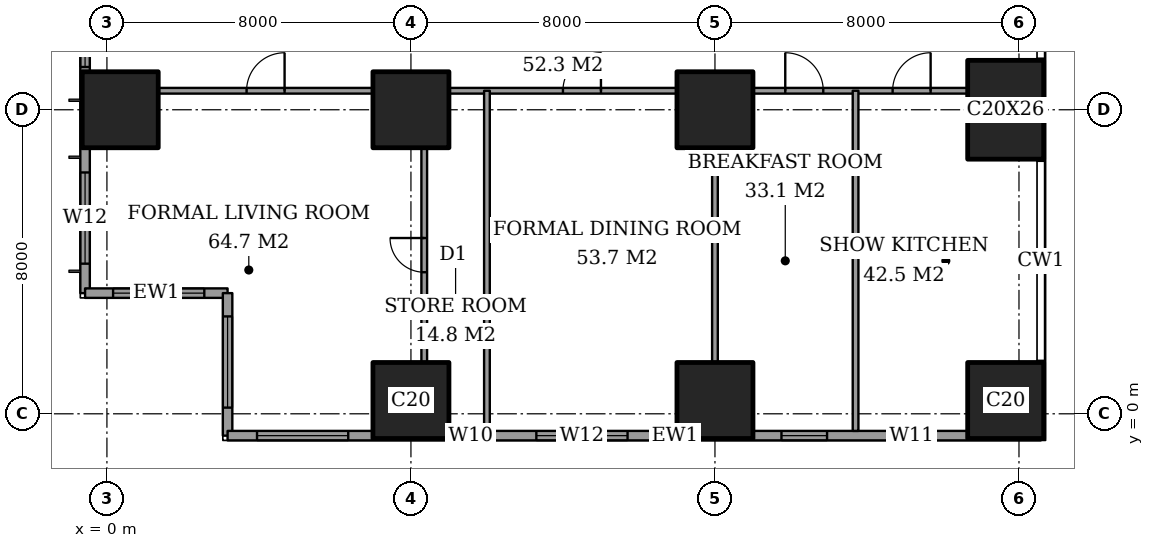
"""IFC4 building model, lengths in metres.
Left out: names, types, materials, properties, quantities, classifications, styles, units other than length and angle.
Written with IfcOpenShell. Run it as: python <this file> out.ifc"""

import sys

from ifc_helpers import new_model, si_unit, direction, frame, frame_2d, origin, origin_2d, place, context, subcontext, project, spatial, rectangle, extrude, element, fill, save


model = new_model("IFC4")
c1 = context("Model", 3, precision=1e-05, world=origin(), true_north=direction((0.0, 1.0)))
c2 = subcontext(c1, "Body", "Model", "MODEL_VIEW")
j1 = project(units=[si_unit("LENGTHUNIT", "METRE"), si_unit("PLANEANGLEUNIT", "RADIAN")], contexts=[c1])
p1 = place(None, origin())
s1 = spatial("IfcSite", under=j1, at=p1, CompositionType="ELEMENT")
p2 = place(p1, origin())
s2 = spatial("IfcBuilding", under=s1, at=p2, CompositionType="ELEMENT")
p3 = place(p2, frame((0.0, 0.0, 128.6)))
s3 = spatial("IfcBuildingStorey", under=s2, at=p3, CompositionType="ELEMENT", Elevation=128.6)
for number, where, z_axis, x_axis in (
    (1, (0.35, 8.0, 0.0), (0.0, 0.0, 1.0), (1.0, 0.0, 0.0)),
    (2, (8.0, 0.35, 0.0), (0.0, 0.0, 1.0), (1.0, 0.0, 0.0)),
    (3, (8.0, 8.0, 0.0), (0.0, 0.0, 1.0), (1.0, 0.0, 0.0)),
    (4, (16.0, 0.35, 0.0), (0.0, 0.0, 1.0), (1.0, 0.0, 0.0)),
    (5, (16.0, 8.0, 0.0), (0.0, 0.0, 1.0), (1.0, 0.0, 0.0)),
    (6, (23.65, 0.35, 0.0), (0.0, 0.0, 1.0), (1.0, 0.0, 0.0)),
):
    element("IfcColumn", number, at=place(p3, frame(where, z_axis=z_axis, x_axis=x_axis)), inside=s3, PredefinedType="COLUMN", context=c2, shape_type="SweptSolid", body=[
        extrude(rectangle(XDim=2.0, YDim=2.0, at=origin_2d()), origin(), (0.0, 0.0, 1.0), 3.6),
    ])
p4 = place(p3, frame((23.65, 8.0, 0.0), z_axis=(0.0, 0.0, 1.0), x_axis=(1.0, 0.0, 0.0)))
e7 = element("IfcColumn", 7, at=p4, inside=s3, PredefinedType="COLUMN", context=c2, shape_type="SweptSolid", body=[
    extrude(rectangle(XDim=2.0, YDim=2.6, at=origin_2d()), origin(), (0.0, 0.0, 1.0), 3.6),
])
p5 = place(p3, frame((-0.575, 44.825, 0.0), z_axis=(0.0, 0.0, 1.0), x_axis=(0.0, -1.0, 0.0)))
e8 = element("IfcWall", 8, at=p5, inside=s3, PredefinedType="SOLIDWALL", context=c2, shape_type="SweptSolid", body=[
    extrude(rectangle(XDim=41.65, YDim=0.25, at=frame_2d((20.825, 0.0))), origin(), (0.0, 0.0, 1.0), 3.6),
])
p6 = place(p5, frame((0.775, 0.0, 0.4)))
e9 = element("IfcOpeningElement", 9, at=p6, cuts=e8, PredefinedType="OPENING", context=c2, shape_type="SweptSolid", body=[
    extrude(rectangle(XDim=2.4, YDim=2.2, at=frame_2d((1.2, 1.1))), frame((0.0, 0.135, 0.0), z_axis=(0.0, -1.0, 0.0), x_axis=(1.0, 0.0, 0.0)), (0.0, 0.0, 1.0), 0.27),
])
p7 = place(p5, frame((6.2, 0.0, 0.4)))
e10 = element("IfcOpeningElement", 10, at=p7, cuts=e8, PredefinedType="OPENING", context=c2, shape_type="SweptSolid", body=[
    extrude(rectangle(XDim=1.2, YDim=2.2, at=frame_2d((0.6, 1.1))), frame((0.0, 0.135, 0.0), z_axis=(0.0, -1.0, 0.0), x_axis=(1.0, 0.0, 0.0)), (0.0, 0.0, 1.0), 0.27),
])
p8 = place(p5, frame((8.525, 0.0, 0.4)))
e11 = element("IfcOpeningElement", 11, at=p8, cuts=e8, PredefinedType="OPENING", context=c2, shape_type="SweptSolid", body=[
    extrude(rectangle(XDim=2.4, YDim=2.2, at=frame_2d((1.2, 1.1))), frame((0.0, 0.135, 0.0), z_axis=(0.0, -1.0, 0.0), x_axis=(1.0, 0.0, 0.0)), (0.0, 0.0, 1.0), 0.27),
])
p9 = place(p5, frame((15.625, 0.0, 0.4)))
e12 = element("IfcOpeningElement", 12, at=p9, cuts=e8, PredefinedType="OPENING", context=c2, shape_type="SweptSolid", body=[
    extrude(rectangle(XDim=2.4, YDim=2.2, at=frame_2d((1.2, 1.1))), frame((0.0, 0.135, 0.0), z_axis=(0.0, -1.0, 0.0), x_axis=(1.0, 0.0, 0.0)), (0.0, 0.0, 1.0), 0.27),
])
p10 = place(p5, frame((23.625, 0.0, 0.4)))
e13 = element("IfcOpeningElement", 13, at=p10, cuts=e8, PredefinedType="OPENING", context=c2, shape_type="SweptSolid", body=[
    extrude(rectangle(XDim=2.4, YDim=2.2, at=frame_2d((1.2, 1.1))), frame((0.0, 0.135, 0.0), z_axis=(0.0, -1.0, 0.0), x_axis=(1.0, 0.0, 0.0)), (0.0, 0.0, 1.0), 0.27),
])
p11 = place(p5, frame((30.825, 0.0, 0.4)))
e14 = element("IfcOpeningElement", 14, at=p11, cuts=e8, PredefinedType="OPENING", context=c2, shape_type="SweptSolid", body=[
    extrude(rectangle(XDim=2.4, YDim=2.2, at=frame_2d((1.2, 1.1))), frame((0.0, 0.135, 0.0), z_axis=(0.0, -1.0, 0.0), x_axis=(1.0, 0.0, 0.0)), (0.0, 0.0, 1.0), 0.27),
])
p12 = place(p5, frame((34.5, 0.0, 0.4)))
e15 = element("IfcOpeningElement", 15, at=p12, cuts=e8, PredefinedType="OPENING", context=c2, shape_type="SweptSolid", body=[
    extrude(rectangle(XDim=1.2, YDim=2.2, at=frame_2d((0.6, 1.1))), frame((0.0, 0.135, 0.0), z_axis=(0.0, -1.0, 0.0), x_axis=(1.0, 0.0, 0.0)), (0.0, 0.0, 1.0), 0.27),
])
p13 = place(p5, frame((38.475, 0.0, 0.4)))
e16 = element("IfcOpeningElement", 16, at=p13, cuts=e8, PredefinedType="OPENING", context=c2, shape_type="SweptSolid", body=[
    extrude(rectangle(XDim=2.4, YDim=2.2, at=frame_2d((1.2, 1.1))), frame((0.0, 0.135, 0.0), z_axis=(0.0, -1.0, 0.0), x_axis=(1.0, 0.0, 0.0)), (0.0, 0.0, 1.0), 0.27),
])
p14 = place(p3, frame((-0.575, 3.175, 0.0), z_axis=(0.0, 0.0, 1.0), x_axis=(1.0, 0.0, 0.0)))
e17 = element("IfcWall", 17, at=p14, inside=s3, PredefinedType="SOLIDWALL", context=c2, shape_type="SweptSolid", body=[
    extrude(rectangle(XDim=3.75, YDim=0.25, at=frame_2d((1.875, 0.0))), origin(), (0.0, 0.0, 1.0), 3.6),
])
p15 = place(p14, frame((0.738, 0.0, 0.4)))
e18 = element("IfcOpeningElement", 18, at=p15, cuts=e17, PredefinedType="OPENING", context=c2, shape_type="SweptSolid", body=[
    extrude(rectangle(XDim=2.4, YDim=2.2, at=frame_2d((1.2, 1.1))), frame((0.0, 0.135, 0.0), z_axis=(0.0, -1.0, 0.0), x_axis=(1.0, 0.0, 0.0)), (0.0, 0.0, 1.0), 0.27),
])
p16 = place(p3, frame((3.175, 3.175, 0.0), z_axis=(0.0, 0.0, 1.0), x_axis=(0.0, -1.0, 0.0)))
e19 = element("IfcWall", 19, at=p16, inside=s3, PredefinedType="SOLIDWALL", context=c2, shape_type="SweptSolid", body=[
    extrude(rectangle(XDim=3.75, YDim=0.25, at=frame_2d((1.875, 0.0))), origin(), (0.0, 0.0, 1.0), 3.6),
])
p17 = place(p16, frame((0.613, 0.0, 0.4)))
e20 = element("IfcOpeningElement", 20, at=p17, cuts=e19, PredefinedType="OPENING", context=c2, shape_type="SweptSolid", body=[
    extrude(rectangle(XDim=2.4, YDim=2.2, at=frame_2d((1.2, 1.1))), frame((0.0, 0.135, 0.0), z_axis=(0.0, -1.0, 0.0), x_axis=(1.0, 0.0, 0.0)), (0.0, 0.0, 1.0), 0.27),
])
p18 = place(p3, frame((3.175, -0.575, 0.0), z_axis=(0.0, 0.0, 1.0), x_axis=(1.0, 0.0, 0.0)))
e21 = element("IfcWall", 21, at=p18, inside=s3, PredefinedType="SOLIDWALL", context=c2, shape_type="SweptSolid", body=[
    extrude(rectangle(XDim=21.4, YDim=0.25, at=frame_2d((10.7, 0.0))), origin(), (0.0, 0.0, 1.0), 3.6),
])
p19 = place(p18, frame((0.775, 0.0, 0.4)))
e22 = element("IfcOpeningElement", 22, at=p19, cuts=e21, PredefinedType="OPENING", context=c2, shape_type="SweptSolid", body=[
    extrude(rectangle(XDim=2.4, YDim=2.2, at=frame_2d((1.2, 1.1))), frame((0.0, 0.135, 0.0), z_axis=(0.0, -1.0, 0.0), x_axis=(1.0, 0.0, 0.0)), (0.0, 0.0, 1.0), 0.27),
])
p20 = place(p18, frame((6.1, 0.0, 0.4)))
e23 = element("IfcOpeningElement", 23, at=p20, cuts=e21, PredefinedType="OPENING", context=c2, shape_type="SweptSolid", body=[
    extrude(rectangle(XDim=0.6, YDim=2.2, at=frame_2d((0.3, 1.1))), frame((0.0, 0.135, 0.0), z_axis=(0.0, -1.0, 0.0), x_axis=(1.0, 0.0, 0.0)), (0.0, 0.0, 1.0), 0.27),
])
p21 = place(p18, frame((8.125, 0.0, 0.4)))
e24 = element("IfcOpeningElement", 24, at=p21, cuts=e21, PredefinedType="OPENING", context=c2, shape_type="SweptSolid", body=[
    extrude(rectangle(XDim=2.4, YDim=2.2, at=frame_2d((1.2, 1.1))), frame((0.0, 0.135, 0.0), z_axis=(0.0, -1.0, 0.0), x_axis=(1.0, 0.0, 0.0)), (0.0, 0.0, 1.0), 0.27),
])
p22 = place(p18, frame((14.575, 0.0, 0.4)))
e25 = element("IfcOpeningElement", 25, at=p22, cuts=e21, PredefinedType="OPENING", context=c2, shape_type="SweptSolid", body=[
    extrude(rectangle(XDim=1.2, YDim=2.2, at=frame_2d((0.6, 1.1))), frame((0.0, 0.135, 0.0), z_axis=(0.0, -1.0, 0.0), x_axis=(1.0, 0.0, 0.0)), (0.0, 0.0, 1.0), 0.27),
])
p23 = place(p18, frame((17.4, 0.0, 0.4)))
e26 = element("IfcOpeningElement", 26, at=p23, cuts=e21, PredefinedType="OPENING", context=c2, shape_type="SweptSolid", body=[
    extrude(rectangle(XDim=1.2, YDim=2.2, at=frame_2d((0.6, 1.1))), frame((0.0, 0.135, 0.0), z_axis=(0.0, -1.0, 0.0), x_axis=(1.0, 0.0, 0.0)), (0.0, 0.0, 1.0), 0.27),
])
p24 = place(p3, frame((1.35, 8.5, 0.0), z_axis=(0.0, 0.0, 1.0), x_axis=(1.0, 0.0, 0.0)))
e27 = element("IfcWall", 27, at=p24, inside=s3, PredefinedType="PARTITIONING", context=c2, shape_type="SweptSolid", body=[
    extrude(rectangle(XDim=5.65, YDim=0.15, at=frame_2d((2.825, 0.0))), origin(), (0.0, 0.0, 1.0), 3.35),
])
p25 = place(p24, frame((2.325, 0.0, 0.0)))
e28 = element("IfcOpeningElement", 28, at=p25, cuts=e27, PredefinedType="OPENING", context=c2, shape_type="SweptSolid", body=[
    extrude(rectangle(XDim=1.0, YDim=2.1, at=frame_2d((0.5, 1.05))), frame((0.0, 0.085, 0.0), z_axis=(0.0, -1.0, 0.0), x_axis=(1.0, 0.0, 0.0)), (0.0, 0.0, 1.0), 0.17),
])
p26 = place(p3, frame((9.0, 8.5, 0.0), z_axis=(0.0, 0.0, 1.0), x_axis=(1.0, 0.0, 0.0)))
e29 = element("IfcWall", 29, at=p26, inside=s3, PredefinedType="PARTITIONING", context=c2, shape_type="SweptSolid", body=[
    extrude(rectangle(XDim=6.0, YDim=0.15, at=frame_2d((3.0, 0.0))), origin(), (0.0, 0.0, 1.0), 3.35),
])
p27 = place(p26, frame((3.0, 0.0, 0.0)))
e30 = element("IfcOpeningElement", 30, at=p27, cuts=e29, PredefinedType="OPENING", context=c2, shape_type="SweptSolid", body=[
    extrude(rectangle(XDim=1.0, YDim=2.1, at=frame_2d((0.5, 1.05))), frame((0.0, 0.085, 0.0), z_axis=(0.0, -1.0, 0.0), x_axis=(1.0, 0.0, 0.0)), (0.0, 0.0, 1.0), 0.17),
])
p28 = place(p3, frame((17.0, 8.5, 0.0), z_axis=(0.0, 0.0, 1.0), x_axis=(1.0, 0.0, 0.0)))
e31 = element("IfcWall", 31, at=p28, inside=s3, PredefinedType="PARTITIONING", context=c2, shape_type="SweptSolid", body=[
    extrude(rectangle(XDim=5.65, YDim=0.15, at=frame_2d((2.825, 0.0))), origin(), (0.0, 0.0, 1.0), 3.35),
])
p29 = place(p28, frame((0.85, 0.0, 0.0)))
e32 = element("IfcOpeningElement", 32, at=p29, cuts=e31, PredefinedType="OPENING", context=c2, shape_type="SweptSolid", body=[
    extrude(rectangle(XDim=1.0, YDim=2.1, at=frame_2d((0.5, 1.05))), frame((0.0, 0.085, 0.0), z_axis=(0.0, -1.0, 0.0), x_axis=(1.0, 0.0, 0.0)), (0.0, 0.0, 1.0), 0.17),
])
p30 = place(p28, frame((3.675, 0.0, 0.0)))
e33 = element("IfcOpeningElement", 33, at=p30, cuts=e31, PredefinedType="OPENING", context=c2, shape_type="SweptSolid", body=[
    extrude(rectangle(XDim=1.0, YDim=2.1, at=frame_2d((0.5, 1.05))), frame((0.0, 0.085, 0.0), z_axis=(0.0, -1.0, 0.0), x_axis=(1.0, 0.0, 0.0)), (0.0, 0.0, 1.0), 0.17),
])
p31 = place(p3, frame((8.35, 1.35, 0.0), z_axis=(0.0, 0.0, 1.0), x_axis=(0.0, 1.0, 0.0)))
e34 = element("IfcWall", 34, at=p31, inside=s3, PredefinedType="PARTITIONING", context=c2, shape_type="SweptSolid", body=[
    extrude(rectangle(XDim=5.65, YDim=0.15, at=frame_2d((2.825, 0.0))), origin(), (0.0, 0.0, 1.0), 3.35),
])
p32 = place(p31, frame((2.375, 0.0, 0.0)))
e35 = element("IfcOpeningElement", 35, at=p32, cuts=e34, PredefinedType="OPENING", context=c2, shape_type="SweptSolid", body=[
    extrude(rectangle(XDim=0.9, YDim=2.1, at=frame_2d((0.45, 1.05))), frame((0.0, 0.085, 0.0), z_axis=(0.0, -1.0, 0.0), x_axis=(1.0, 0.0, 0.0)), (0.0, 0.0, 1.0), 0.17),
])
p33 = place(p3, frame((10.0, -0.45, 0.0), z_axis=(0.0, 0.0, 1.0), x_axis=(0.0, 1.0, 0.0)))
e36 = element("IfcWall", 36, at=p33, inside=s3, PredefinedType="PARTITIONING", context=c2, shape_type="SweptSolid", body=[
    extrude(rectangle(XDim=8.95, YDim=0.15, at=frame_2d((4.475, 0.0))), origin(), (0.0, 0.0, 1.0), 3.35),
])
p34 = place(p3, frame((16.0, 1.35, 0.0), z_axis=(0.0, 0.0, 1.0), x_axis=(0.0, 1.0, 0.0)))
e37 = element("IfcWall", 37, at=p34, inside=s3, PredefinedType="PARTITIONING", context=c2, shape_type="SweptSolid", body=[
    extrude(rectangle(XDim=5.65, YDim=0.15, at=frame_2d((2.825, 0.0))), origin(), (0.0, 0.0, 1.0), 3.35),
])
p35 = place(p3, frame((19.7, -0.45, 0.0), z_axis=(0.0, 0.0, 1.0), x_axis=(0.0, 1.0, 0.0)))
e38 = element("IfcWall", 38, at=p35, inside=s3, PredefinedType="PARTITIONING", context=c2, shape_type="SweptSolid", body=[
    extrude(rectangle(XDim=8.95, YDim=0.15, at=frame_2d((4.475, 0.0))), origin(), (0.0, 0.0, 1.0), 3.35),
])
p36 = place(p12, origin())
e39 = element("IfcWindow", 39, at=p36, inside=s3, PartitioningType="SINGLE_PANEL", PredefinedType="WINDOW", context=c2, shape_type="SweptSolid", body=[
    extrude(rectangle(XDim=1.2, YDim=2.2, at=frame_2d((0.6, 1.1))), frame((0.0, 0.03, 0.0), z_axis=(0.0, -1.0, 0.0), x_axis=(1.0, 0.0, 0.0)), (0.0, 0.0, 1.0), 0.06),
])
fill(e15, e39)
p37 = place(p13, origin())
e40 = element("IfcWindow", 40, at=p37, inside=s3, PartitioningType="SINGLE_PANEL", PredefinedType="WINDOW", context=c2, shape_type="SweptSolid", body=[
    extrude(rectangle(XDim=2.4, YDim=2.2, at=frame_2d((1.2, 1.1))), frame((0.0, 0.03, 0.0), z_axis=(0.0, -1.0, 0.0), x_axis=(1.0, 0.0, 0.0)), (0.0, 0.0, 1.0), 0.06),
])
fill(e16, e40)
p38 = place(p15, origin())
e41 = element("IfcWindow", 41, at=p38, inside=s3, PartitioningType="SINGLE_PANEL", PredefinedType="WINDOW", context=c2, shape_type="SweptSolid", body=[
    extrude(rectangle(XDim=2.4, YDim=2.2, at=frame_2d((1.2, 1.1))), frame((0.0, 0.03, 0.0), z_axis=(0.0, -1.0, 0.0), x_axis=(1.0, 0.0, 0.0)), (0.0, 0.0, 1.0), 0.06),
])
fill(e18, e41)
p39 = place(p17, origin())
e42 = element("IfcWindow", 42, at=p39, inside=s3, PartitioningType="SINGLE_PANEL", PredefinedType="WINDOW", context=c2, shape_type="SweptSolid", body=[
    extrude(rectangle(XDim=2.4, YDim=2.2, at=frame_2d((1.2, 1.1))), frame((0.0, 0.03, 0.0), z_axis=(0.0, -1.0, 0.0), x_axis=(1.0, 0.0, 0.0)), (0.0, 0.0, 1.0), 0.06),
])
fill(e20, e42)
p40 = place(p19, origin())
e43 = element("IfcWindow", 43, at=p40, inside=s3, PartitioningType="SINGLE_PANEL", PredefinedType="WINDOW", context=c2, shape_type="SweptSolid", body=[
    extrude(rectangle(XDim=2.4, YDim=2.2, at=frame_2d((1.2, 1.1))), frame((0.0, 0.03, 0.0), z_axis=(0.0, -1.0, 0.0), x_axis=(1.0, 0.0, 0.0)), (0.0, 0.0, 1.0), 0.06),
])
fill(e22, e43)
p41 = place(p20, origin())
e44 = element("IfcWindow", 44, at=p41, inside=s3, PartitioningType="SINGLE_PANEL", PredefinedType="WINDOW", context=c2, shape_type="SweptSolid", body=[
    extrude(rectangle(XDim=0.6, YDim=2.2, at=frame_2d((0.3, 1.1))), frame((0.0, 0.03, 0.0), z_axis=(0.0, -1.0, 0.0), x_axis=(1.0, 0.0, 0.0)), (0.0, 0.0, 1.0), 0.06),
])
fill(e23, e44)
p42 = place(p21, origin())
e45 = element("IfcWindow", 45, at=p42, inside=s3, PartitioningType="SINGLE_PANEL", PredefinedType="WINDOW", context=c2, shape_type="SweptSolid", body=[
    extrude(rectangle(XDim=2.4, YDim=2.2, at=frame_2d((1.2, 1.1))), frame((0.0, 0.03, 0.0), z_axis=(0.0, -1.0, 0.0), x_axis=(1.0, 0.0, 0.0)), (0.0, 0.0, 1.0), 0.06),
])
fill(e24, e45)
p43 = place(p22, origin())
e46 = element("IfcWindow", 46, at=p43, inside=s3, PartitioningType="SINGLE_PANEL", PredefinedType="WINDOW", context=c2, shape_type="SweptSolid", body=[
    extrude(rectangle(XDim=1.2, YDim=2.2, at=frame_2d((0.6, 1.1))), frame((0.0, 0.03, 0.0), z_axis=(0.0, -1.0, 0.0), x_axis=(1.0, 0.0, 0.0)), (0.0, 0.0, 1.0), 0.06),
])
fill(e25, e46)
p44 = place(p23, origin())
e47 = element("IfcWindow", 47, at=p44, inside=s3, PartitioningType="SINGLE_PANEL", PredefinedType="WINDOW", context=c2, shape_type="SweptSolid", body=[
    extrude(rectangle(XDim=1.2, YDim=2.2, at=frame_2d((0.6, 1.1))), frame((0.0, 0.03, 0.0), z_axis=(0.0, -1.0, 0.0), x_axis=(1.0, 0.0, 0.0)), (0.0, 0.0, 1.0), 0.06),
])
fill(e26, e47)
p45 = place(p25, origin())
e48 = element("IfcDoor", 48, at=p45, inside=s3, OperationType="SINGLE_SWING_LEFT", PredefinedType="DOOR", context=c2, shape_type="SweptSolid", body=[
    extrude(rectangle(XDim=1.0, YDim=2.1, at=frame_2d((0.5, 1.05))), frame((0.0, 0.025, 0.0), z_axis=(0.0, -1.0, 0.0), x_axis=(1.0, 0.0, 0.0)), (0.0, 0.0, 1.0), 0.05),
])
fill(e28, e48)
p46 = place(p32, origin())
e49 = element("IfcDoor", 49, at=p46, inside=s3, OperationType="SINGLE_SWING_LEFT", PredefinedType="DOOR", context=c2, shape_type="SweptSolid", body=[
    extrude(rectangle(XDim=0.9, YDim=2.1, at=frame_2d((0.45, 1.05))), frame((0.0, 0.025, 0.0), z_axis=(0.0, -1.0, 0.0), x_axis=(1.0, 0.0, 0.0)), (0.0, 0.0, 1.0), 0.05),
])
fill(e35, e49)
p47 = place(p27, origin())
e50 = element("IfcDoor", 50, at=p47, inside=s3, OperationType="SINGLE_SWING_LEFT", PredefinedType="DOOR", context=c2, shape_type="SweptSolid", body=[
    extrude(rectangle(XDim=1.0, YDim=2.1, at=frame_2d((0.5, 1.05))), frame((0.0, 0.025, 0.0), z_axis=(0.0, -1.0, 0.0), x_axis=(1.0, 0.0, 0.0)), (0.0, 0.0, 1.0), 0.05),
])
fill(e30, e50)
p48 = place(p29, origin())
e51 = element("IfcDoor", 51, at=p48, inside=s3, OperationType="SINGLE_SWING_RIGHT", PredefinedType="DOOR", context=c2, shape_type="SweptSolid", body=[
    extrude(rectangle(XDim=1.0, YDim=2.1, at=frame_2d((0.5, 1.05))), frame((0.0, 0.025, 0.0), z_axis=(0.0, -1.0, 0.0), x_axis=(1.0, 0.0, 0.0)), (0.0, 0.0, 1.0), 0.05),
])
fill(e32, e51)
p49 = place(p30, origin())
e52 = element("IfcDoor", 52, at=p49, inside=s3, OperationType="SINGLE_SWING_LEFT", PredefinedType="DOOR", context=c2, shape_type="SweptSolid", body=[
    extrude(rectangle(XDim=1.0, YDim=2.1, at=frame_2d((0.5, 1.05))), frame((0.0, 0.025, 0.0), z_axis=(0.0, -1.0, 0.0), x_axis=(1.0, 0.0, 0.0)), (0.0, 0.0, 1.0), 0.05),
])
fill(e33, e52)
save(model, sys.argv[1])
